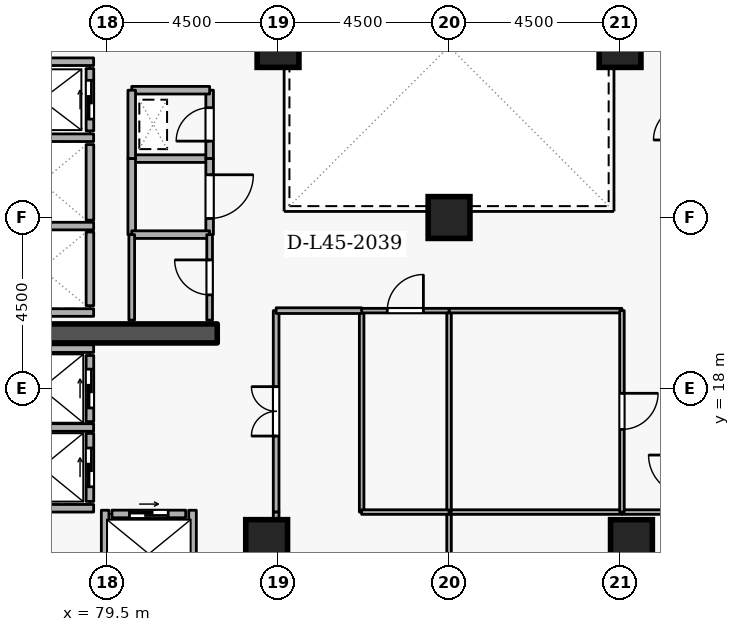
"""IFC4 building model, lengths in metres.
Left out: names, types, materials, properties, quantities, classifications, styles, units other than length and angle.
Written with IfcOpenShell. Run it as: python <this file> out.ifc"""

import sys

from ifc_helpers import new_model, si_unit, direction, frame, frame_2d, origin, origin_2d, place, context, subcontext, project, spatial, rectangle, extrude, element, fill, save


model = new_model("IFC4")
c1 = context("Model", 3, precision=1e-05, world=origin(), true_north=direction((0.0, 1.0)))
c2 = subcontext(c1, "Body", "Model", "MODEL_VIEW")
j1 = project(units=[si_unit("LENGTHUNIT", "METRE"), si_unit("PLANEANGLEUNIT", "RADIAN")], contexts=[c1])
p1 = place(None, origin())
s1 = spatial("IfcSite", under=j1, at=p1, CompositionType="ELEMENT")
p2 = place(p1, origin())
s2 = spatial("IfcBuilding", under=s1, at=p2, CompositionType="ELEMENT")
p3 = place(p2, frame((0.0, 0.0, 170.7)))
s3 = spatial("IfcBuildingStorey", under=s2, at=p3, CompositionType="ELEMENT", Elevation=170.7)
p4 = place(p3, frame((76.6, 19.45, 0.0), z_axis=(0.0, 0.0, 1.0), x_axis=(1.0, 0.0, 0.0)))
e1 = element("IfcWall", 1, at=p4, inside=s3, PredefinedType="SHEAR", context=c2, shape_type="SweptSolid", body=[
    extrude(rectangle(XDim=5.8, YDim=0.5, at=frame_2d((2.9, 0.0))), origin(), (0.0, 0.0, 1.0), 3.6),
])
for number, where, z_axis, x_axis in (
    (2, (93.3, 14.0, 0.0), (0.0, 0.0, 1.0), (1.0, 0.0, 0.0)),
    (3, (83.7, 14.0, 0.0), (0.0, 0.0, 1.0), (1.0, 0.0, 0.0)),
    (4, (93.0, 27.0, 0.0), (0.0, 0.0, 1.0), (1.0, 0.0, 0.0)),
    (5, (84.0, 27.0, 0.0), (0.0, 0.0, 1.0), (1.0, 0.0, 0.0)),
    (6, (88.5, 22.5, 0.0), (0.0, 0.0, 1.0), (1.0, 0.0, 0.0)),
):
    element("IfcColumn", number, at=place(p3, frame(where, z_axis=z_axis, x_axis=x_axis)), inside=s3, PredefinedType="COLUMN", context=c2, shape_type="SweptSolid", body=[
        extrude(rectangle(XDim=1.1, YDim=1.1, at=origin_2d()), origin(), (0.0, 0.0, 1.0), 3.6),
    ])
p5 = place(p3, frame((79.05, 24.78, 0.0), z_axis=(0.0, 0.0, 1.0), x_axis=(0.0, 1.0, 0.0)))
e7 = element("IfcWall", 7, at=p5, inside=s3, PredefinedType="STANDARD", context=c2, shape_type="SweptSolid", body=[
    extrude(rectangle(XDim=1.64, YDim=0.2, at=frame_2d((0.82, 0.0))), origin(), (0.0, 0.0, 1.0), 3.26),
])
p6 = place(p5, frame((0.31, 0.0, 0.0)))
e8 = element("IfcOpeningElement", 8, at=p6, cuts=e7, PredefinedType="OPENING", context=c2, shape_type="SweptSolid", body=[
    extrude(rectangle(XDim=1.02, YDim=2.06, at=frame_2d((0.51, 1.03))), frame((0.0, 0.11, 0.0), z_axis=(0.0, -1.0, 0.0), x_axis=(1.0, 0.0, 0.0)), (0.0, 0.0, 1.0), 0.22),
])
p7 = place(p3, frame((79.05, 22.43, 0.0), z_axis=(0.0, 0.0, 1.0), x_axis=(0.0, 1.0, 0.0)))
e9 = element("IfcWall", 9, at=p7, inside=s3, PredefinedType="STANDARD", context=c2, shape_type="SweptSolid", body=[
    extrude(rectangle(XDim=1.99, YDim=0.2, at=frame_2d((0.995, 0.0))), origin(), (0.0, 0.0, 1.0), 3.26),
])
p8 = place(p3, frame((79.05, 20.18, 0.0), z_axis=(0.0, 0.0, 1.0), x_axis=(0.0, 1.0, 0.0)))
e10 = element("IfcWall", 10, at=p8, inside=s3, PredefinedType="STANDARD", context=c2, shape_type="SweptSolid", body=[
    extrude(rectangle(XDim=1.94, YDim=0.2, at=frame_2d((0.97, 0.0))), origin(), (0.0, 0.0, 1.0), 3.26),
])
p9 = place(p3, frame((79.05, 17.13, 0.0), z_axis=(0.0, 0.0, 1.0), x_axis=(0.0, 1.0, 0.0)))
e11 = element("IfcWall", 11, at=p9, inside=s3, PredefinedType="STANDARD", context=c2, shape_type="SweptSolid", body=[
    extrude(rectangle(XDim=1.74, YDim=0.2, at=frame_2d((0.87, 0.0))), origin(), (0.0, 0.0, 1.0), 3.26),
])
p10 = place(p9, frame((0.36, 0.0, 0.0)))
e12 = element("IfcOpeningElement", 12, at=p10, cuts=e11, PredefinedType="OPENING", context=c2, shape_type="SweptSolid", body=[
    extrude(rectangle(XDim=1.02, YDim=2.06, at=frame_2d((0.51, 1.03))), frame((0.0, 0.11, 0.0), z_axis=(0.0, -1.0, 0.0), x_axis=(1.0, 0.0, 0.0)), (0.0, 0.0, 1.0), 0.22),
])
p11 = place(p3, frame((79.05, 15.03, 0.0), z_axis=(0.0, 0.0, 1.0), x_axis=(0.0, 1.0, 0.0)))
e13 = element("IfcWall", 13, at=p11, inside=s3, PredefinedType="STANDARD", context=c2, shape_type="SweptSolid", body=[
    extrude(rectangle(XDim=1.79, YDim=0.2, at=frame_2d((0.895, 0.0))), origin(), (0.0, 0.0, 1.0), 3.26),
])
p12 = place(p11, frame((0.385, 0.0, 0.0)))
e14 = element("IfcOpeningElement", 14, at=p12, cuts=e13, PredefinedType="OPENING", context=c2, shape_type="SweptSolid", body=[
    extrude(rectangle(XDim=1.02, YDim=2.06, at=frame_2d((0.51, 1.03))), frame((0.0, 0.11, 0.0), z_axis=(0.0, -1.0, 0.0), x_axis=(1.0, 0.0, 0.0)), (0.0, 0.0, 1.0), 0.22),
])
p13 = place(p3, frame((79.63, 14.7, 0.0), z_axis=(0.0, 0.0, 1.0), x_axis=(1.0, 0.0, 0.0)))
e15 = element("IfcWall", 15, at=p13, inside=s3, PredefinedType="STANDARD", context=c2, shape_type="SweptSolid", body=[
    extrude(rectangle(XDim=1.94, YDim=0.2, at=frame_2d((0.97, 0.0))), origin(), (0.0, 0.0, 1.0), 3.26),
])
p14 = place(p13, frame((0.46, 0.0, 0.0)))
e16 = element("IfcOpeningElement", 16, at=p14, cuts=e15, PredefinedType="OPENING", context=c2, shape_type="SweptSolid", body=[
    extrude(rectangle(XDim=1.02, YDim=2.06, at=frame_2d((0.51, 1.03))), frame((0.0, 0.11, 0.0), z_axis=(0.0, -1.0, 0.0), x_axis=(1.0, 0.0, 0.0)), (0.0, 0.0, 1.0), 0.22),
])
p15 = place(p3, frame((76.612, 26.6, 0.0), z_axis=(0.0, 0.0, 1.0), x_axis=(1.0, 0.0, 0.0)))
e17 = element("IfcWall", 17, at=p15, inside=s3, PredefinedType="STANDARD", context=c2, shape_type="SweptSolid", body=[
    extrude(rectangle(XDim=2.536, YDim=0.2, at=frame_2d((1.268, 0.0))), origin(), (0.0, 0.0, 1.0), 1.785),
])
for number, where, z_axis, x_axis in (
    (18, (76.612, 24.6, 0.0), (0.0, 0.0, 1.0), (1.0, 0.0, 0.0)),
    (19, (76.612, 22.275, 0.0), (0.0, 0.0, 1.0), (1.0, 0.0, 0.0)),
    (20, (76.612, 20.0, 0.0), (0.0, 0.0, 1.0), (1.0, 0.0, 0.0)),
):
    element("IfcWall", number, at=place(p3, frame(where, z_axis=z_axis, x_axis=x_axis)), inside=s3, PredefinedType="STANDARD", context=c2, shape_type="SweptSolid", body=[
        extrude(rectangle(XDim=2.536, YDim=0.2, at=frame_2d((1.268, 0.0))), origin(), (0.0, 0.0, 1.0), 3.26),
    ])
p16 = place(p3, frame((76.402, 19.05, 0.0), z_axis=(0.0, 0.0, 1.0), x_axis=(1.0, 0.0, 0.0)))
e21 = element("IfcWall", 21, at=p16, inside=s3, PredefinedType="STANDARD", context=c2, shape_type="SweptSolid", body=[
    extrude(rectangle(XDim=2.746, YDim=0.2, at=frame_2d((1.373, 0.0))), origin(), (0.0, 0.0, 1.0), 2.465),
])
p17 = place(p3, frame((76.402, 16.975, 0.0), z_axis=(0.0, 0.0, 1.0), x_axis=(1.0, 0.0, 0.0)))
e22 = element("IfcWall", 22, at=p17, inside=s3, PredefinedType="STANDARD", context=c2, shape_type="SweptSolid", body=[
    extrude(rectangle(XDim=2.746, YDim=0.2, at=frame_2d((1.373, 0.0))), origin(), (0.0, 0.0, 1.0), 3.26),
])
p18 = place(p3, frame((76.512, 14.85, 0.0), z_axis=(0.0, 0.0, 1.0), x_axis=(1.0, 0.0, 0.0)))
e23 = element("IfcWall", 23, at=p18, inside=s3, PredefinedType="STANDARD", context=c2, shape_type="SweptSolid", body=[
    extrude(rectangle(XDim=2.636, YDim=0.2, at=frame_2d((1.318, 0.0))), origin(), (0.0, 0.0, 1.0), 3.26),
])
for number, where, z_axis, x_axis in (
    (24, (81.75, 12.612, 0.0), (0.0, 0.0, 1.0), (0.0, 1.0, 0.0)),
    (25, (79.45, 12.612, 0.0), (0.0, 0.0, 1.0), (0.0, 1.0, 0.0)),
):
    element("IfcWall", number, at=place(p3, frame(where, z_axis=z_axis, x_axis=x_axis)), inside=s3, PredefinedType="STANDARD", context=c2, shape_type="SweptSolid", body=[
        extrude(rectangle(XDim=2.186, YDim=0.2, at=frame_2d((1.093, 0.0))), origin(), (0.0, 0.0, 1.0), 3.26),
    ])
p19 = place(p3, frame((80.15, 24.05, 0.0), z_axis=(0.0, 0.0, 1.0), x_axis=(1.0, 0.0, 0.0)))
e26 = element("IfcWall", 26, at=p19, inside=s3, PredefinedType="STANDARD", context=c2, shape_type="SweptSolid", body=[
    extrude(rectangle(XDim=2.05, YDim=0.2, at=frame_2d((1.025, 0.0))), origin(), (0.0, 0.0, 1.0), 3.26),
])
p20 = place(p3, frame((82.2, 24.05, 0.0), z_axis=(0.0, 0.0, 1.0), x_axis=(0.0, 1.0, 0.0)))
e27 = element("IfcWall", 27, at=p20, inside=s3, PredefinedType="STANDARD", context=c2, shape_type="SweptSolid", body=[
    extrude(rectangle(XDim=1.8, YDim=0.2, at=frame_2d((0.9, 0.0))), origin(), (0.0, 0.0, 1.0), 3.26),
])
p21 = place(p20, frame((0.46, 0.0, 0.0)))
e28 = element("IfcOpeningElement", 28, at=p21, cuts=e27, PredefinedType="OPENING", context=c2, shape_type="SweptSolid", body=[
    extrude(rectangle(XDim=0.88, YDim=2.04, at=frame_2d((0.44, 1.02))), frame((0.0, 0.11, 0.0), z_axis=(0.0, -1.0, 0.0), x_axis=(1.0, 0.0, 0.0)), (0.0, 0.0, 1.0), 0.22),
])
p22 = place(p3, frame((82.2, 25.85, 0.0), z_axis=(0.0, 0.0, 1.0), x_axis=(-1.0, 0.0, 0.0)))
e29 = element("IfcWall", 29, at=p22, inside=s3, PredefinedType="STANDARD", context=c2, shape_type="SweptSolid", body=[
    extrude(rectangle(XDim=2.05, YDim=0.2, at=frame_2d((1.025, 0.0))), origin(), (0.0, 0.0, 1.0), 3.26),
])
p23 = place(p3, frame((80.15, 25.85, 0.0), z_axis=(0.0, 0.0, 1.0), x_axis=(0.0, -1.0, 0.0)))
e30 = element("IfcWall", 30, at=p23, inside=s3, PredefinedType="STANDARD", context=c2, shape_type="SweptSolid", body=[
    extrude(rectangle(XDim=1.8, YDim=0.2, at=frame_2d((0.9, 0.0))), origin(), (0.0, 0.0, 1.0), 3.26),
])
p24 = place(p3, frame((80.15, 22.05, 0.0), z_axis=(0.0, 0.0, 1.0), x_axis=(0.0, 1.0, 0.0)))
e31 = element("IfcWall", 31, at=p24, inside=s3, PredefinedType="STANDARD", context=c2, shape_type="SweptSolid", body=[
    extrude(rectangle(XDim=2.0, YDim=0.2, at=frame_2d((1.0, 0.0))), origin(), (0.0, 0.0, 1.0), 3.26),
])
p25 = place(p3, frame((82.2, 24.05, 0.0), z_axis=(0.0, 0.0, 1.0), x_axis=(0.0, -1.0, 0.0)))
e32 = element("IfcWall", 32, at=p25, inside=s3, PredefinedType="STANDARD", context=c2, shape_type="SweptSolid", body=[
    extrude(rectangle(XDim=2.0, YDim=0.2, at=frame_2d((1.0, 0.0))), origin(), (0.0, 0.0, 1.0), 3.26),
])
p26 = place(p25, frame((0.425, 0.0, 0.0)))
e33 = element("IfcOpeningElement", 33, at=p26, cuts=e32, PredefinedType="OPENING", context=c2, shape_type="SweptSolid", body=[
    extrude(rectangle(XDim=1.15, YDim=2.1, at=frame_2d((0.575, 1.05))), frame((0.0, 0.11, 0.0), z_axis=(0.0, -1.0, 0.0), x_axis=(1.0, 0.0, 0.0)), (0.0, 0.0, 1.0), 0.22),
])
p27 = place(p3, frame((82.2, 22.05, 0.0), z_axis=(0.0, 0.0, 1.0), x_axis=(-1.0, 0.0, 0.0)))
e34 = element("IfcWall", 34, at=p27, inside=s3, PredefinedType="STANDARD", context=c2, shape_type="SweptSolid", body=[
    extrude(rectangle(XDim=2.05, YDim=0.2, at=frame_2d((1.025, 0.0))), origin(), (0.0, 0.0, 1.0), 3.26),
])
p28 = place(p3, frame((82.2, 19.8, 0.0), z_axis=(0.0, 0.0, 1.0), x_axis=(0.0, 1.0, 0.0)))
e35 = element("IfcWall", 35, at=p28, inside=s3, PredefinedType="PARTITIONING", context=c2, shape_type="SweptSolid", body=[
    extrude(rectangle(XDim=2.25, YDim=0.15, at=frame_2d((1.125, 0.0))), origin(), (0.0, 0.0, 1.0), 3.26),
])
p29 = place(p28, frame((0.665, 0.0, 0.0)))
e36 = element("IfcOpeningElement", 36, at=p29, cuts=e35, PredefinedType="OPENING", context=c2, shape_type="SweptSolid", body=[
    extrude(rectangle(XDim=0.92, YDim=2.08, at=frame_2d((0.46, 1.04))), frame((0.0, 0.085, 0.0), z_axis=(0.0, -1.0, 0.0), x_axis=(1.0, 0.0, 0.0)), (0.0, 0.0, 1.0), 0.17),
])
p30 = place(p3, frame((80.15, 22.05, 0.0), z_axis=(0.0, 0.0, 1.0), x_axis=(0.0, -1.0, 0.0)))
e37 = element("IfcWall", 37, at=p30, inside=s3, PredefinedType="PARTITIONING", context=c2, shape_type="SweptSolid", body=[
    extrude(rectangle(XDim=2.25, YDim=0.15, at=frame_2d((1.125, 0.0))), origin(), (0.0, 0.0, 1.0), 3.26),
])
p31 = place(p3, frame((88.5, 9.28, 0.0), z_axis=(0.0, 0.0, 1.0), x_axis=(0.0, 1.0, 0.0)))
e38 = element("IfcWall", 38, at=p31, inside=s3, PredefinedType="PARTITIONING", context=c2, shape_type="SweptSolid", body=[
    extrude(rectangle(XDim=5.47, YDim=0.12, at=frame_2d((2.735, 0.0))), origin(), (0.0, 0.0, 1.0), 2.802),
])
p32 = place(p3, frame((88.5, 14.75, 0.0), z_axis=(0.0, 0.0, 1.0), x_axis=(1.0, 0.0, 0.0)))
e39 = element("IfcWall", 39, at=p32, inside=s3, PredefinedType="PARTITIONING", context=c2, shape_type="SweptSolid", body=[
    extrude(rectangle(XDim=4.55, YDim=0.12, at=frame_2d((2.275, 0.0))), origin(), (0.0, 0.0, 1.0), 3.26),
])
p33 = place(p3, frame((93.05, 14.75, 0.0), z_axis=(0.0, 0.0, 1.0), x_axis=(1.0, 0.0, 0.0)))
e40 = element("IfcWall", 40, at=p33, inside=s3, PredefinedType="PARTITIONING", context=c2, shape_type="SweptSolid", body=[
    extrude(rectangle(XDim=1.75, YDim=0.12, at=frame_2d((0.875, 0.0))), origin(), (0.0, 0.0, 1.0), 3.26),
])
p34 = place(p3, frame((88.5, 14.75, 0.0), z_axis=(0.0, 0.0, 1.0), x_axis=(0.0, 1.0, 0.0)))
e41 = element("IfcWall", 41, at=p34, inside=s3, PredefinedType="PARTITIONING", context=c2, shape_type="SweptSolid", body=[
    extrude(rectangle(XDim=5.3, YDim=0.12, at=frame_2d((2.65, 0.0))), origin(), (0.0, 0.0, 1.0), 2.802),
])
p35 = place(p3, frame((88.5, 20.05, 0.0), z_axis=(0.0, 0.0, 1.0), x_axis=(1.0, 0.0, 0.0)))
e42 = element("IfcWall", 42, at=p35, inside=s3, PredefinedType="PARTITIONING", context=c2, shape_type="SweptSolid", body=[
    extrude(rectangle(XDim=4.55, YDim=0.12, at=frame_2d((2.275, 0.0))), origin(), (0.0, 0.0, 1.0), 3.26),
])
p36 = place(p3, frame((93.05, 20.05, 0.0), z_axis=(0.0, 0.0, 1.0), x_axis=(0.0, -1.0, 0.0)))
e43 = element("IfcWall", 43, at=p36, inside=s3, PredefinedType="PARTITIONING", context=c2, shape_type="SweptSolid", body=[
    extrude(rectangle(XDim=5.3, YDim=0.12, at=frame_2d((2.65, 0.0))), origin(), (0.0, 0.0, 1.0), 3.26),
])
p37 = place(p36, frame((2.175, 0.0, 0.0)))
e44 = element("IfcOpeningElement", 44, at=p37, cuts=e43, PredefinedType="OPENING", context=c2, shape_type="SweptSolid", body=[
    extrude(rectangle(XDim=0.95, YDim=2.1, at=frame_2d((0.475, 1.05))), frame((0.0, 0.07, 0.0), z_axis=(0.0, -1.0, 0.0), x_axis=(1.0, 0.0, 0.0)), (0.0, 0.0, 1.0), 0.14),
])
p38 = place(p3, frame((86.2, 14.75, 0.0), z_axis=(0.0, 0.0, 1.0), x_axis=(0.0, 1.0, 0.0)))
e45 = element("IfcWall", 45, at=p38, inside=s3, PredefinedType="PARTITIONING", context=c2, shape_type="SweptSolid", body=[
    extrude(rectangle(XDim=5.3, YDim=0.12, at=frame_2d((2.65, 0.0))), origin(), (0.0, 0.0, 1.0), 3.26),
])
p39 = place(p3, frame((86.2, 20.05, 0.0), z_axis=(0.0, 0.0, 1.0), x_axis=(1.0, 0.0, 0.0)))
e46 = element("IfcWall", 46, at=p39, inside=s3, PredefinedType="PARTITIONING", context=c2, shape_type="SweptSolid", body=[
    extrude(rectangle(XDim=2.3, YDim=0.12, at=frame_2d((1.15, 0.0))), origin(), (0.0, 0.0, 1.0), 3.26),
])
p40 = place(p39, frame((0.675, 0.0, 0.0)))
e47 = element("IfcOpeningElement", 47, at=p40, cuts=e46, PredefinedType="OPENING", context=c2, shape_type="SweptSolid", body=[
    extrude(rectangle(XDim=0.95, YDim=2.1, at=frame_2d((0.475, 1.05))), frame((0.0, 0.07, 0.0), z_axis=(0.0, -1.0, 0.0), x_axis=(1.0, 0.0, 0.0)), (0.0, 0.0, 1.0), 0.14),
])
p41 = place(p3, frame((88.5, 14.75, 0.0), z_axis=(0.0, 0.0, 1.0), x_axis=(-1.0, 0.0, 0.0)))
e48 = element("IfcWall", 48, at=p41, inside=s3, PredefinedType="PARTITIONING", context=c2, shape_type="SweptSolid", body=[
    extrude(rectangle(XDim=2.3, YDim=0.12, at=frame_2d((1.15, 0.0))), origin(), (0.0, 0.0, 1.0), 3.26),
])
p42 = place(p3, frame((83.95, 14.75, 0.0), z_axis=(0.0, 0.0, 1.0), x_axis=(0.0, 1.0, 0.0)))
e49 = element("IfcWall", 49, at=p42, inside=s3, PredefinedType="PARTITIONING", context=c2, shape_type="SweptSolid", body=[
    extrude(rectangle(XDim=5.3, YDim=0.15, at=frame_2d((2.65, 0.0))), origin(), (0.0, 0.0, 1.0), 3.26),
])
p43 = place(p42, frame((2.0, 0.0, 0.0)))
e50 = element("IfcOpeningElement", 50, at=p43, cuts=e49, PredefinedType="OPENING", context=c2, shape_type="SweptSolid", body=[
    extrude(rectangle(XDim=1.3, YDim=2.12, at=frame_2d((0.65, 1.06))), frame((0.0, 0.085, 0.0), z_axis=(0.0, -1.0, 0.0), x_axis=(1.0, 0.0, 0.0)), (0.0, 0.0, 1.0), 0.17),
])
p44 = place(p3, frame((83.95, 20.05, 0.0), z_axis=(0.0, 0.0, 1.0), x_axis=(1.0, 0.0, 0.0)))
e51 = element("IfcWall", 51, at=p44, inside=s3, PredefinedType="PARTITIONING", context=c2, shape_type="SweptSolid", body=[
    extrude(rectangle(XDim=2.25, YDim=0.15, at=frame_2d((1.125, 0.0))), origin(), (0.0, 0.0, 1.0), 3.26),
])
p45 = place(p3, frame((83.95, 12.4, 0.0), z_axis=(0.0, 0.0, 1.0), x_axis=(0.0, 1.0, 0.0)))
e52 = element("IfcWall", 52, at=p45, inside=s3, PredefinedType="PARTITIONING", context=c2, shape_type="SweptSolid", body=[
    extrude(rectangle(XDim=2.35, YDim=0.15, at=frame_2d((1.175, 0.0))), origin(), (0.0, 0.0, 1.0), 3.26),
])
p46 = place(p6, origin())
e53 = element("IfcDoor", 53, at=p46, inside=s3, OperationType="SLIDING_TO_LEFT", PredefinedType="DOOR", context=c2, shape_type="SweptSolid", body=[
    extrude(rectangle(XDim=1.02, YDim=2.06, at=frame_2d((0.51, 1.03))), frame((0.0, 0.025, 0.0), z_axis=(0.0, -1.0, 0.0), x_axis=(1.0, 0.0, 0.0)), (0.0, 0.0, 1.0), 0.05),
])
fill(e8, e53)
p47 = place(p10, origin())
e54 = element("IfcDoor", 54, at=p47, inside=s3, OperationType="SLIDING_TO_LEFT", PredefinedType="DOOR", context=c2, shape_type="SweptSolid", body=[
    extrude(rectangle(XDim=1.02, YDim=2.06, at=frame_2d((0.51, 1.03))), frame((0.0, 0.025, 0.0), z_axis=(0.0, -1.0, 0.0), x_axis=(1.0, 0.0, 0.0)), (0.0, 0.0, 1.0), 0.05),
])
fill(e12, e54)
p48 = place(p12, origin())
e55 = element("IfcDoor", 55, at=p48, inside=s3, OperationType="SLIDING_TO_LEFT", PredefinedType="DOOR", context=c2, shape_type="SweptSolid", body=[
    extrude(rectangle(XDim=1.02, YDim=2.06, at=frame_2d((0.51, 1.03))), frame((0.0, 0.025, 0.0), z_axis=(0.0, -1.0, 0.0), x_axis=(1.0, 0.0, 0.0)), (0.0, 0.0, 1.0), 0.05),
])
fill(e14, e55)
p49 = place(p14, origin())
e56 = element("IfcDoor", 56, at=p49, inside=s3, OperationType="SLIDING_TO_LEFT", PredefinedType="DOOR", context=c2, shape_type="SweptSolid", body=[
    extrude(rectangle(XDim=1.02, YDim=2.06, at=frame_2d((0.51, 1.03))), frame((0.0, 0.025, 0.0), z_axis=(0.0, -1.0, 0.0), x_axis=(1.0, 0.0, 0.0)), (0.0, 0.0, 1.0), 0.05),
])
fill(e16, e56)
p50 = place(p21, origin())
e57 = element("IfcDoor", 57, at=p50, inside=s3, OperationType="SINGLE_SWING_LEFT", PredefinedType="DOOR", context=c2, shape_type="SweptSolid", body=[
    extrude(rectangle(XDim=0.88, YDim=2.04, at=frame_2d((0.44, 1.02))), frame((0.0, 0.025, 0.0), z_axis=(0.0, -1.0, 0.0), x_axis=(1.0, 0.0, 0.0)), (0.0, 0.0, 1.0), 0.05),
])
fill(e28, e57)
p51 = place(p29, origin())
e58 = element("IfcDoor", 58, at=p51, inside=s3, OperationType="SINGLE_SWING_RIGHT", PredefinedType="DOOR", context=c2, shape_type="SweptSolid", body=[
    extrude(rectangle(XDim=0.92, YDim=2.08, at=frame_2d((0.46, 1.04))), frame((0.0, 0.025, 0.0), z_axis=(0.0, -1.0, 0.0), x_axis=(1.0, 0.0, 0.0)), (0.0, 0.0, 1.0), 0.05),
])
fill(e36, e58)
p52 = place(p26, origin())
e59 = element("IfcDoor", 59, at=p52, inside=s3, OperationType="SINGLE_SWING_LEFT", PredefinedType="DOOR", context=c2, shape_type="SweptSolid", body=[
    extrude(rectangle(XDim=1.15, YDim=2.1, at=frame_2d((0.575, 1.05))), frame((0.0, 0.025, 0.0), z_axis=(0.0, -1.0, 0.0), x_axis=(1.0, 0.0, 0.0)), (0.0, 0.0, 1.0), 0.05),
])
fill(e33, e59)
p53 = place(p37, origin())
e60 = element("IfcDoor", 60, at=p53, inside=s3, OperationType="SINGLE_SWING_LEFT", PredefinedType="DOOR", context=c2, shape_type="SweptSolid", body=[
    extrude(rectangle(XDim=0.95, YDim=2.1, at=frame_2d((0.475, 1.05))), frame((0.0, 0.025, 0.0), z_axis=(0.0, -1.0, 0.0), x_axis=(1.0, 0.0, 0.0)), (0.0, 0.0, 1.0), 0.05),
])
fill(e44, e60)
p54 = place(p40, origin())
e61 = element("IfcDoor", 61, at=p54, inside=s3, OperationType="SINGLE_SWING_RIGHT", PredefinedType="DOOR", context=c2, shape_type="SweptSolid", body=[
    extrude(rectangle(XDim=0.95, YDim=2.1, at=frame_2d((0.475, 1.05))), frame((0.0, 0.025, 0.0), z_axis=(0.0, -1.0, 0.0), x_axis=(1.0, 0.0, 0.0)), (0.0, 0.0, 1.0), 0.05),
])
fill(e47, e61)
p55 = place(p43, origin())
e62 = element("IfcDoor", 62, at=p55, inside=s3, OperationType="DOUBLE_DOOR_SINGLE_SWING", PredefinedType="DOOR", context=c2, shape_type="SweptSolid", body=[
    extrude(rectangle(XDim=1.3, YDim=2.12, at=frame_2d((0.65, 1.06))), frame((0.0, 0.025, 0.0), z_axis=(0.0, -1.0, 0.0), x_axis=(1.0, 0.0, 0.0)), (0.0, 0.0, 1.0), 0.05),
])
fill(e50, e62)
save(model, sys.argv[1])
